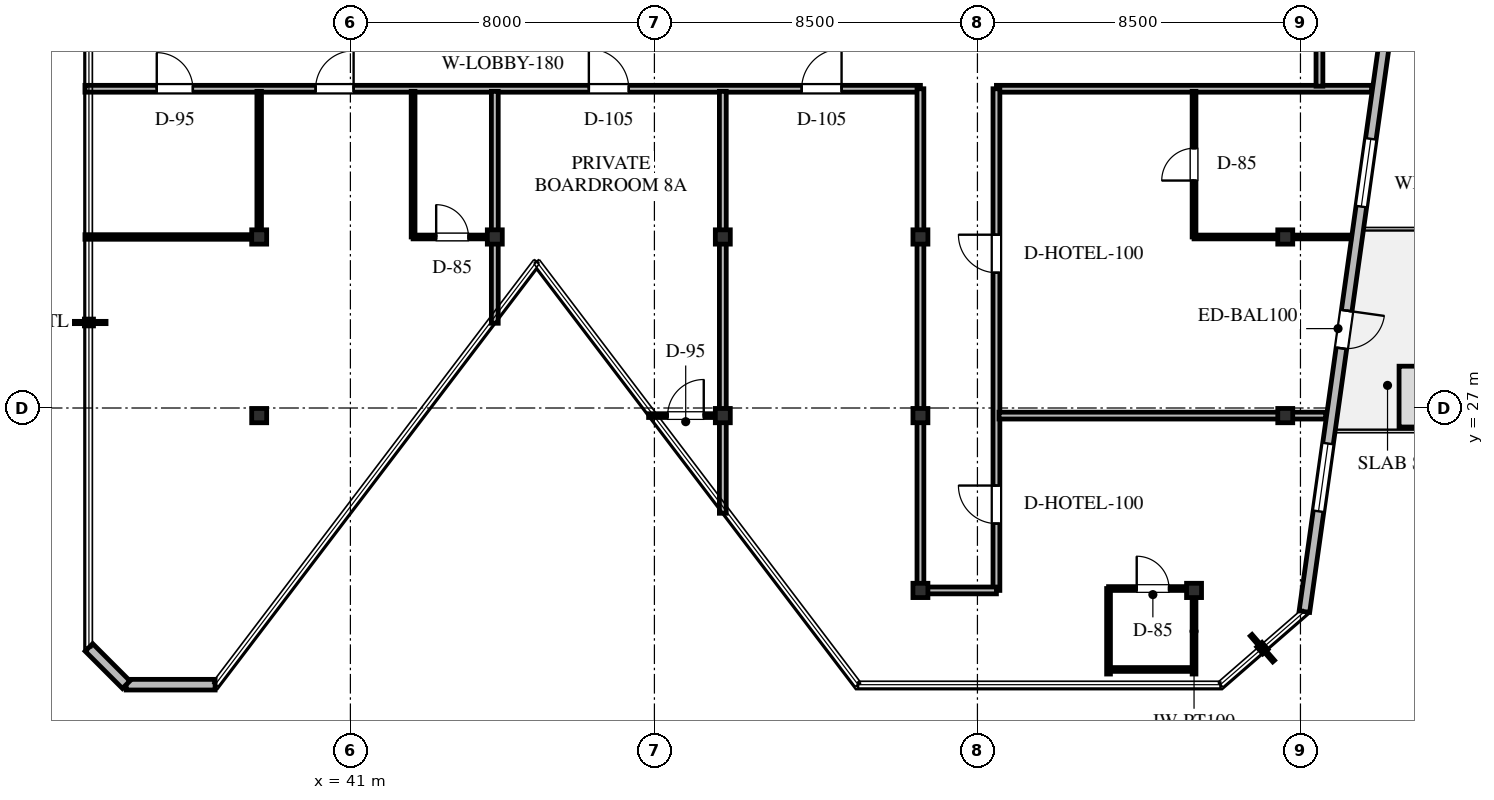
"""IFC4 building model, lengths in metres.
Left out: names, types, materials, properties, quantities, classifications, styles, units other than length and angle.
Written with IfcOpenShell. Run it as: python <this file> out.ifc"""

import sys

from ifc_helpers import new_model, si_unit, direction, frame, frame_2d, origin, origin_2d, place, context, subcontext, project, spatial, rectangle, i_section, extrude, element, fill, save


model = new_model("IFC4")
c1 = context("Model", 3, precision=1e-05, world=origin(), true_north=direction((0.0, 1.0)))
c2 = subcontext(c1, "Body", "Model", "MODEL_VIEW")
j1 = project(units=[si_unit("LENGTHUNIT", "METRE"), si_unit("PLANEANGLEUNIT", "RADIAN")], contexts=[c1])
p1 = place(None, origin())
s1 = spatial("IfcSite", under=j1, at=p1, CompositionType="ELEMENT")
p2 = place(p1, origin())
s2 = spatial("IfcBuilding", under=s1, at=p2, CompositionType="ELEMENT")
p3 = place(p2, frame((0.0, 0.0, 303.9)))
s3 = spatial("IfcBuildingStorey", under=s2, at=p3, CompositionType="ELEMENT", Elevation=303.9)
for number, where, z_axis, x_axis in (
    (1, (44.8, 31.5, 0.0), (0.0, 0.0, 1.0), (1.0, 0.0, 0.0)),
    (2, (50.8, 31.5, 0.0), (0.0, 0.0, 1.0), (1.0, 0.0, 0.0)),
    (3, (56.0, 31.5, 0.0), (0.0, 0.0, 1.0), (1.0, 0.0, 0.0)),
    (4, (65.6, 31.5, 0.0), (0.0, 0.0, 1.0), (1.0, 0.0, 0.0)),
    (5, (38.6, 31.5, 0.0), (0.0, 0.0, 1.0), (1.0, 0.0, 0.0)),
    (6, (38.6, 26.8, 0.0), (0.0, 0.0, 1.0), (1.0, 0.0, 0.0)),
    (7, (50.8, 26.8, 0.0), (0.0, 0.0, 1.0), (1.0, 0.0, 0.0)),
    (8, (56.0, 26.8, 0.0), (0.0, 0.0, 1.0), (1.0, 0.0, 0.0)),
    (9, (65.6, 26.8, 0.0), (0.0, 0.0, 1.0), (1.0, 0.0, 0.0)),
    (10, (56.0, 22.2, 0.0), (0.0, 0.0, 1.0), (1.0, 0.0, 0.0)),
    (11, (63.2, 22.2, 0.0), (0.0, 0.0, 1.0), (1.0, 0.0, 0.0)),
):
    element("IfcColumn", number, at=place(p3, frame(where, z_axis=z_axis, x_axis=x_axis)), inside=s3, PredefinedType="COLUMN", context=c2, shape_type="SweptSolid", body=[
        extrude(i_section(OverallWidth=0.394, OverallDepth=0.376, WebThickness=0.017, FlangeThickness=0.028, FilletRadius=0.03, at=origin_2d()), origin(), (0.0, 0.0, 1.0), 3.6),
    ])
p4 = place(p3, frame((68.375, 37.8, 0.0), z_axis=(0.0, 0.0, 1.0), x_axis=(-0.139177573889, -0.990267440102, 0.0)))
e12 = element("IfcWall", 12, at=p4, inside=s3, PredefinedType="STANDARD", context=c2, shape_type="SweptSolid", body=[
    extrude(rectangle(XDim=16.317, YDim=0.28, at=frame_2d((8.159, 0.0))), origin(), (0.0, 0.0, 1.0), 3.365),
])
p5 = place(p4, frame((8.319, 0.0, 0.0)))
e13 = element("IfcOpeningElement", 13, at=p5, cuts=e12, PredefinedType="OPENING", context=c2, shape_type="SweptSolid", body=[
    extrude(rectangle(XDim=1.0, YDim=2.15, at=frame_2d((0.5, 1.075))), frame((0.0, 0.15, 0.0), z_axis=(0.0, -1.0, 0.0), x_axis=(1.0, 0.0, 0.0)), (0.0, 0.0, 1.0), 0.3),
])
p6 = place(p4, frame((3.754, 0.0, 0.65)))
e14 = element("IfcOpeningElement", 14, at=p6, cuts=e12, PredefinedType="OPENING", context=c2, shape_type="SweptSolid", body=[
    extrude(rectangle(XDim=1.8, YDim=2.1, at=frame_2d((0.9, 1.05))), frame((0.0, 0.15, 0.0), z_axis=(0.0, -1.0, 0.0), x_axis=(1.0, 0.0, 0.0)), (0.0, 0.0, 1.0), 0.3),
])
p7 = place(p4, frame((11.85, 0.0, 0.65)))
e15 = element("IfcOpeningElement", 15, at=p7, cuts=e12, PredefinedType="OPENING", context=c2, shape_type="SweptSolid", body=[
    extrude(rectangle(XDim=1.8, YDim=2.1, at=frame_2d((0.9, 1.05))), frame((0.0, 0.15, 0.0), z_axis=(0.0, -1.0, 0.0), x_axis=(1.0, 0.0, 0.0)), (0.0, 0.0, 1.0), 0.3),
])
p8 = place(p3, frame((37.44, 19.72, 0.0), z_axis=(0.0, 0.0, 1.0), x_axis=(-1.0, 0.0, 0.0)))
e16 = element("IfcWall", 16, at=p8, inside=s3, PredefinedType="STANDARD", context=c2, shape_type="SweptSolid", body=[
    extrude(rectangle(XDim=2.341, YDim=0.28, at=frame_2d((1.17, 0.0))), origin(), (0.0, 0.0, 1.0), 3.365),
])
p9 = place(p3, frame((35.1, 19.72, 0.0), z_axis=(0.0, 0.0, 1.0), x_axis=(-0.707018662703, 0.70719488869, 0.0)))
e17 = element("IfcWall", 17, at=p9, inside=s3, PredefinedType="STANDARD", context=c2, shape_type="SweptSolid", body=[
    extrude(rectangle(XDim=1.385, YDim=0.28, at=frame_2d((0.693, 0.0))), origin(), (0.0, 0.0, 1.0), 3.365),
])
p10 = place(p3, frame((34.015, 35.4, 0.0), z_axis=(0.0, 0.0, 1.0), x_axis=(1.0, 0.0, 0.0)))
e18 = element("IfcWall", 18, at=p10, inside=s3, PredefinedType="STANDARD", context=c2, shape_type="SweptSolid", body=[
    extrude(rectangle(XDim=21.985, YDim=0.18, at=frame_2d((10.993, 0.0))), origin(), (0.0, 0.0, 1.0), 2.754),
])
p11 = place(p10, frame((1.89, 0.0, 0.0)))
e19 = element("IfcOpeningElement", 19, at=p11, cuts=e18, PredefinedType="OPENING", context=c2, shape_type="SweptSolid", body=[
    extrude(rectangle(XDim=0.95, YDim=2.15, at=frame_2d((0.475, 1.075))), frame((0.0, 0.1, 0.0), z_axis=(0.0, -1.0, 0.0), x_axis=(1.0, 0.0, 0.0)), (0.0, 0.0, 1.0), 0.2),
])
p12 = place(p10, frame((6.07, 0.0, 0.0)))
e20 = element("IfcOpeningElement", 20, at=p12, cuts=e18, PredefinedType="OPENING", context=c2, shape_type="SweptSolid", body=[
    extrude(rectangle(XDim=1.0, YDim=2.15, at=frame_2d((0.5, 1.075))), frame((0.0, 0.1, 0.0), z_axis=(0.0, -1.0, 0.0), x_axis=(1.0, 0.0, 0.0)), (0.0, 0.0, 1.0), 0.2),
])
p13 = place(p10, frame((13.26, 0.0, 0.0)))
e21 = element("IfcOpeningElement", 21, at=p13, cuts=e18, PredefinedType="OPENING", context=c2, shape_type="SweptSolid", body=[
    extrude(rectangle(XDim=1.05, YDim=2.2, at=frame_2d((0.525, 1.1))), frame((0.0, 0.1, 0.0), z_axis=(0.0, -1.0, 0.0), x_axis=(1.0, 0.0, 0.0)), (0.0, 0.0, 1.0), 0.2),
])
p14 = place(p10, frame((18.86, 0.0, 0.0)))
e22 = element("IfcOpeningElement", 22, at=p14, cuts=e18, PredefinedType="OPENING", context=c2, shape_type="SweptSolid", body=[
    extrude(rectangle(XDim=1.05, YDim=2.2, at=frame_2d((0.525, 1.1))), frame((0.0, 0.1, 0.0), z_axis=(0.0, -1.0, 0.0), x_axis=(1.0, 0.0, 0.0)), (0.0, 0.0, 1.0), 0.2),
])
p15 = place(p3, frame((58.0, 35.4, 0.0), z_axis=(0.0, 0.0, 1.0), x_axis=(1.0, 0.0, 0.0)))
e23 = element("IfcWall", 23, at=p15, inside=s3, PredefinedType="STANDARD", context=c2, shape_type="SweptSolid", body=[
    extrude(rectangle(XDim=9.871, YDim=0.18, at=frame_2d((4.936, 0.0))), origin(), (0.0, 0.0, 1.0), 3.365),
])
p16 = place(p3, frame((66.5, 35.468, 0.0), z_axis=(0.0, 0.0, 1.0), x_axis=(0.0, 1.0, 0.0)))
e24 = element("IfcWall", 24, at=p16, inside=s3, PredefinedType="STANDARD", context=c2, shape_type="SweptSolid", body=[
    extrude(rectangle(XDim=2.582, YDim=0.18, at=frame_2d((1.291, 0.0))), origin(), (0.0, 0.0, 1.0), 2.754),
])
p17 = place(p3, frame((56.0, 22.2, 0.0), z_axis=(0.0, 0.0, 1.0), x_axis=(0.0, 1.0, 0.0)))
e25 = element("IfcWall", 25, at=p17, inside=s3, PredefinedType="STANDARD", context=c2, shape_type="SweptSolid", body=[
    extrude(rectangle(XDim=13.2, YDim=0.18, at=frame_2d((6.6, 0.0))), origin(), (0.0, 0.0, 1.0), 2.754),
])
p18 = place(p3, frame((58.0, 22.2, 0.0), z_axis=(0.0, 0.0, 1.0), x_axis=(0.0, 1.0, 0.0)))
e26 = element("IfcWall", 26, at=p18, inside=s3, PredefinedType="STANDARD", context=c2, shape_type="SweptSolid", body=[
    extrude(rectangle(XDim=13.2, YDim=0.18, at=frame_2d((6.6, 0.0))), origin(), (0.0, 0.0, 1.0), 2.754),
])
p19 = place(p18, frame((1.76, 0.0, 0.0)))
e27 = element("IfcOpeningElement", 27, at=p19, cuts=e26, PredefinedType="OPENING", context=c2, shape_type="SweptSolid", body=[
    extrude(rectangle(XDim=1.0, YDim=2.15, at=frame_2d((0.5, 1.075))), frame((0.0, 0.1, 0.0), z_axis=(0.0, -1.0, 0.0), x_axis=(1.0, 0.0, 0.0)), (0.0, 0.0, 1.0), 0.2),
])
p20 = place(p18, frame((8.36, 0.0, 0.0)))
e28 = element("IfcOpeningElement", 28, at=p20, cuts=e26, PredefinedType="OPENING", context=c2, shape_type="SweptSolid", body=[
    extrude(rectangle(XDim=1.0, YDim=2.15, at=frame_2d((0.5, 1.075))), frame((0.0, 0.1, 0.0), z_axis=(0.0, -1.0, 0.0), x_axis=(1.0, 0.0, 0.0)), (0.0, 0.0, 1.0), 0.2),
])
p21 = place(p3, frame((56.0, 22.2, 0.0), z_axis=(0.0, 0.0, 1.0), x_axis=(1.0, 0.0, 0.0)))
e29 = element("IfcWall", 29, at=p21, inside=s3, PredefinedType="STANDARD", context=c2, shape_type="SweptSolid", body=[
    extrude(rectangle(XDim=2.0, YDim=0.18, at=frame_2d((1.0, 0.0))), origin(), (0.0, 0.0, 1.0), 2.754),
])
p22 = place(p3, frame((38.6, 31.5, 0.0), z_axis=(0.0, 0.0, 1.0), x_axis=(0.0, 1.0, 0.0)))
e30 = element("IfcWall", 30, at=p22, inside=s3, PredefinedType="PARTITIONING", context=c2, shape_type="SweptSolid", body=[
    extrude(rectangle(XDim=3.832, YDim=0.12, at=frame_2d((1.916, 0.0))), origin(), (0.0, 0.0, 1.0), 2.754),
])
p23 = place(p3, frame((34.015, 31.5, 0.0), z_axis=(0.0, 0.0, 1.0), x_axis=(1.0, 0.0, 0.0)))
e31 = element("IfcWall", 31, at=p23, inside=s3, PredefinedType="PARTITIONING", context=c2, shape_type="SweptSolid", body=[
    extrude(rectangle(XDim=4.585, YDim=0.12, at=frame_2d((2.292, 0.0))), origin(), (0.0, 0.0, 1.0), 2.754),
])
p24 = place(p3, frame((58.068, 26.8, 0.0), z_axis=(0.0, 0.0, 1.0), x_axis=(1.0, 0.0, 0.0)))
e32 = element("IfcWall", 32, at=p24, inside=s3, PredefinedType="STANDARD", context=c2, shape_type="SweptSolid", body=[
    extrude(rectangle(XDim=8.594, YDim=0.18, at=frame_2d((4.297, 0.0))), origin(), (0.0, 0.0, 1.0), 2.754),
])
p25 = place(p3, frame((60.95, 22.25, 0.0), z_axis=(0.0, 0.0, 1.0), x_axis=(1.0, 0.0, 0.0)))
e33 = element("IfcWall", 33, at=p25, inside=s3, PredefinedType="PARTITIONING", context=c2, shape_type="SweptSolid", body=[
    extrude(rectangle(XDim=2.25, YDim=0.1, at=frame_2d((1.125, 0.0))), origin(), (0.0, 0.0, 1.0), 2.754),
])
p26 = place(p25, frame((0.741, 0.0, 0.0)))
e34 = element("IfcOpeningElement", 34, at=p26, cuts=e33, PredefinedType="OPENING", context=c2, shape_type="SweptSolid", body=[
    extrude(rectangle(XDim=0.85, YDim=2.1, at=frame_2d((0.425, 1.05))), frame((0.0, 0.06, 0.0), z_axis=(0.0, -1.0, 0.0), x_axis=(1.0, 0.0, 0.0)), (0.0, 0.0, 1.0), 0.12),
])
for number, where, z_axis, x_axis in (
    (35, (60.95, 20.0, 0.0), (0.0, 0.0, 1.0), (0.0, 1.0, 0.0)),
    (36, (63.2, 20.0, 0.0), (0.0, 0.0, 1.0), (0.0, 1.0, 0.0)),
):
    element("IfcWall", number, at=place(p3, frame(where, z_axis=z_axis, x_axis=x_axis)), inside=s3, PredefinedType="PARTITIONING", context=c2, shape_type="SweptSolid", body=[
        extrude(rectangle(XDim=2.25, YDim=0.1, at=frame_2d((1.125, 0.0))), origin(), (0.0, 0.0, 1.0), 2.754),
    ])
p27 = place(p3, frame((61.018, 20.12, 0.0), z_axis=(0.0, 0.0, 1.0), x_axis=(1.0, 0.0, 0.0)))
e37 = element("IfcWall", 37, at=p27, inside=s3, PredefinedType="PARTITIONING", context=c2, shape_type="SweptSolid", body=[
    extrude(rectangle(XDim=2.114, YDim=0.1, at=frame_2d((1.057, 0.0))), origin(), (0.0, 0.0, 1.0), 3.365),
])
p28 = place(p3, frame((63.2, 31.5, 0.0), z_axis=(0.0, 0.0, 1.0), x_axis=(1.0, 0.0, 0.0)))
e38 = element("IfcWall", 38, at=p28, inside=s3, PredefinedType="PARTITIONING", context=c2, shape_type="SweptSolid", body=[
    extrude(rectangle(XDim=4.123, YDim=0.1, at=frame_2d((2.062, 0.0))), origin(), (0.0, 0.0, 1.0), 2.754),
])
p29 = place(p3, frame((63.2, 31.5, 0.0), z_axis=(0.0, 0.0, 1.0), x_axis=(0.0, 1.0, 0.0)))
e39 = element("IfcWall", 39, at=p29, inside=s3, PredefinedType="PARTITIONING", context=c2, shape_type="SweptSolid", body=[
    extrude(rectangle(XDim=3.832, YDim=0.1, at=frame_2d((1.916, 0.0))), origin(), (0.0, 0.0, 1.0), 2.754),
])
p30 = place(p29, frame((1.485, 0.0, 0.0)))
e40 = element("IfcOpeningElement", 40, at=p30, cuts=e39, PredefinedType="OPENING", context=c2, shape_type="SweptSolid", body=[
    extrude(rectangle(XDim=0.85, YDim=2.1, at=frame_2d((0.425, 1.05))), frame((0.0, 0.06, 0.0), z_axis=(0.0, -1.0, 0.0), x_axis=(1.0, 0.0, 0.0)), (0.0, 0.0, 1.0), 0.12),
])
p31 = place(p3, frame((42.65, 31.5, 0.0), z_axis=(0.0, 0.0, 1.0), x_axis=(0.0, 1.0, 0.0)))
e41 = element("IfcWall", 41, at=p31, inside=s3, PredefinedType="PARTITIONING", context=c2, shape_type="SweptSolid", body=[
    extrude(rectangle(XDim=3.832, YDim=0.1, at=frame_2d((1.916, 0.0))), origin(), (0.0, 0.0, 1.0), 2.754),
])
p32 = place(p3, frame((42.65, 31.5, 0.0), z_axis=(0.0, 0.0, 1.0), x_axis=(1.0, 0.0, 0.0)))
e42 = element("IfcWall", 42, at=p32, inside=s3, PredefinedType="PARTITIONING", context=c2, shape_type="SweptSolid", body=[
    extrude(rectangle(XDim=2.082, YDim=0.1, at=frame_2d((1.041, 0.0))), origin(), (0.0, 0.0, 1.0), 2.754),
])
p33 = place(p32, frame((0.607, 0.0, 0.0)))
e43 = element("IfcOpeningElement", 43, at=p33, cuts=e42, PredefinedType="OPENING", context=c2, shape_type="SweptSolid", body=[
    extrude(rectangle(XDim=0.85, YDim=2.1, at=frame_2d((0.425, 1.05))), frame((0.0, 0.06, 0.0), z_axis=(0.0, -1.0, 0.0), x_axis=(1.0, 0.0, 0.0)), (0.0, 0.0, 1.0), 0.12),
])
p34 = place(p3, frame((44.8, 29.23, 0.0), z_axis=(0.0, 0.0, 1.0), x_axis=(0.0, 1.0, 0.0)))
e44 = element("IfcWall", 44, at=p34, inside=s3, PredefinedType="STANDARD", context=c2, shape_type="SweptSolid", body=[
    extrude(rectangle(XDim=6.102, YDim=0.18, at=frame_2d((3.051, 0.0))), origin(), (0.0, 0.0, 1.0), 2.754),
])
p35 = place(p3, frame((48.847, 26.8, 0.0), z_axis=(0.0, 0.0, 1.0), x_axis=(1.0, 0.0, 0.0)))
e45 = element("IfcWall", 45, at=p35, inside=s3, PredefinedType="PARTITIONING", context=c2, shape_type="SweptSolid", body=[
    extrude(rectangle(XDim=1.885, YDim=0.1, at=frame_2d((0.943, 0.0))), origin(), (0.0, 0.0, 1.0), 2.754),
])
p36 = place(p35, frame((0.502, 0.0, 0.0)))
e46 = element("IfcOpeningElement", 46, at=p36, cuts=e45, PredefinedType="OPENING", context=c2, shape_type="SweptSolid", body=[
    extrude(rectangle(XDim=0.95, YDim=2.15, at=frame_2d((0.475, 1.075))), frame((0.0, 0.06, 0.0), z_axis=(0.0, -1.0, 0.0), x_axis=(1.0, 0.0, 0.0)), (0.0, 0.0, 1.0), 0.12),
])
p37 = place(p3, frame((50.8, 24.23, 0.0), z_axis=(0.0, 0.0, 1.0), x_axis=(0.0, 1.0, 0.0)))
e47 = element("IfcWall", 47, at=p37, inside=s3, PredefinedType="STANDARD", context=c2, shape_type="SweptSolid", body=[
    extrude(rectangle(XDim=11.102, YDim=0.18, at=frame_2d((5.551, 0.0))), origin(), (0.0, 0.0, 1.0), 2.754),
])
p38 = place(p5, origin())
e48 = element("IfcDoor", 48, at=p38, inside=s3, OperationType="SINGLE_SWING_LEFT", PredefinedType="DOOR", context=c2, shape_type="SweptSolid", body=[
    extrude(rectangle(XDim=1.0, YDim=2.15, at=frame_2d((0.5, 1.075))), frame((0.0, 0.025, 0.0), z_axis=(0.0, -1.0, 0.0), x_axis=(1.0, 0.0, 0.0)), (0.0, 0.0, 1.0), 0.05),
])
fill(e13, e48)
p39 = place(p6, origin())
e49 = element("IfcWindow", 49, at=p39, inside=s3, PartitioningType="SINGLE_PANEL", PredefinedType="WINDOW", context=c2, shape_type="SweptSolid", body=[
    extrude(rectangle(XDim=1.8, YDim=2.1, at=frame_2d((0.9, 1.05))), frame((0.0, 0.03, 0.0), z_axis=(0.0, -1.0, 0.0), x_axis=(1.0, 0.0, 0.0)), (0.0, 0.0, 1.0), 0.06),
])
fill(e14, e49)
p40 = place(p7, origin())
e50 = element("IfcWindow", 50, at=p40, inside=s3, PartitioningType="SINGLE_PANEL", PredefinedType="WINDOW", context=c2, shape_type="SweptSolid", body=[
    extrude(rectangle(XDim=1.8, YDim=2.1, at=frame_2d((0.9, 1.05))), frame((0.0, 0.03, 0.0), z_axis=(0.0, -1.0, 0.0), x_axis=(1.0, 0.0, 0.0)), (0.0, 0.0, 1.0), 0.06),
])
fill(e15, e50)
p41 = place(p11, origin())
e51 = element("IfcDoor", 51, at=p41, inside=s3, OperationType="SINGLE_SWING_LEFT", PredefinedType="DOOR", context=c2, shape_type="SweptSolid", body=[
    extrude(rectangle(XDim=0.95, YDim=2.15, at=frame_2d((0.475, 1.075))), frame((0.0, 0.025, 0.0), z_axis=(0.0, -1.0, 0.0), x_axis=(1.0, 0.0, 0.0)), (0.0, 0.0, 1.0), 0.05),
])
fill(e19, e51)
p42 = place(p19, origin())
e52 = element("IfcDoor", 52, at=p42, inside=s3, OperationType="SINGLE_SWING_RIGHT", PredefinedType="DOOR", context=c2, shape_type="SweptSolid", body=[
    extrude(rectangle(XDim=1.0, YDim=2.15, at=frame_2d((0.5, 1.075))), frame((0.0, 0.025, 0.0), z_axis=(0.0, -1.0, 0.0), x_axis=(1.0, 0.0, 0.0)), (0.0, 0.0, 1.0), 0.05),
])
fill(e27, e52)
p43 = place(p26, origin())
e53 = element("IfcDoor", 53, at=p43, inside=s3, OperationType="SINGLE_SWING_LEFT", PredefinedType="DOOR", context=c2, shape_type="SweptSolid", body=[
    extrude(rectangle(XDim=0.85, YDim=2.1, at=frame_2d((0.425, 1.05))), frame((0.0, 0.025, 0.0), z_axis=(0.0, -1.0, 0.0), x_axis=(1.0, 0.0, 0.0)), (0.0, 0.0, 1.0), 0.05),
])
fill(e34, e53)
p44 = place(p20, origin())
e54 = element("IfcDoor", 54, at=p44, inside=s3, OperationType="SINGLE_SWING_RIGHT", PredefinedType="DOOR", context=c2, shape_type="SweptSolid", body=[
    extrude(rectangle(XDim=1.0, YDim=2.15, at=frame_2d((0.5, 1.075))), frame((0.0, 0.025, 0.0), z_axis=(0.0, -1.0, 0.0), x_axis=(1.0, 0.0, 0.0)), (0.0, 0.0, 1.0), 0.05),
])
fill(e28, e54)
p45 = place(p30, origin())
e55 = element("IfcDoor", 55, at=p45, inside=s3, OperationType="SINGLE_SWING_LEFT", PredefinedType="DOOR", context=c2, shape_type="SweptSolid", body=[
    extrude(rectangle(XDim=0.85, YDim=2.1, at=frame_2d((0.425, 1.05))), frame((0.0, 0.025, 0.0), z_axis=(0.0, -1.0, 0.0), x_axis=(1.0, 0.0, 0.0)), (0.0, 0.0, 1.0), 0.05),
])
fill(e40, e55)
p46 = place(p12, origin())
e56 = element("IfcDoor", 56, at=p46, inside=s3, OperationType="SINGLE_SWING_RIGHT", PredefinedType="DOOR", context=c2, shape_type="SweptSolid", body=[
    extrude(rectangle(XDim=1.0, YDim=2.15, at=frame_2d((0.5, 1.075))), frame((0.0, 0.025, 0.0), z_axis=(0.0, -1.0, 0.0), x_axis=(1.0, 0.0, 0.0)), (0.0, 0.0, 1.0), 0.05),
])
fill(e20, e56)
p47 = place(p33, origin())
e57 = element("IfcDoor", 57, at=p47, inside=s3, OperationType="SINGLE_SWING_LEFT", PredefinedType="DOOR", context=c2, shape_type="SweptSolid", body=[
    extrude(rectangle(XDim=0.85, YDim=2.1, at=frame_2d((0.425, 1.05))), frame((0.0, 0.025, 0.0), z_axis=(0.0, -1.0, 0.0), x_axis=(1.0, 0.0, 0.0)), (0.0, 0.0, 1.0), 0.05),
])
fill(e43, e57)
p48 = place(p36, origin())
e58 = element("IfcDoor", 58, at=p48, inside=s3, OperationType="SINGLE_SWING_RIGHT", PredefinedType="DOOR", context=c2, shape_type="SweptSolid", body=[
    extrude(rectangle(XDim=0.95, YDim=2.15, at=frame_2d((0.475, 1.075))), frame((0.0, 0.025, 0.0), z_axis=(0.0, -1.0, 0.0), x_axis=(1.0, 0.0, 0.0)), (0.0, 0.0, 1.0), 0.05),
])
fill(e46, e58)
p49 = place(p13, origin())
e59 = element("IfcDoor", 59, at=p49, inside=s3, OperationType="SINGLE_SWING_LEFT", PredefinedType="DOOR", context=c2, shape_type="SweptSolid", body=[
    extrude(rectangle(XDim=1.05, YDim=2.2, at=frame_2d((0.525, 1.1))), frame((0.0, 0.025, 0.0), z_axis=(0.0, -1.0, 0.0), x_axis=(1.0, 0.0, 0.0)), (0.0, 0.0, 1.0), 0.05),
])
fill(e21, e59)
p50 = place(p14, origin())
e60 = element("IfcDoor", 60, at=p50, inside=s3, OperationType="SINGLE_SWING_RIGHT", PredefinedType="DOOR", context=c2, shape_type="SweptSolid", body=[
    extrude(rectangle(XDim=1.05, YDim=2.2, at=frame_2d((0.525, 1.1))), frame((0.0, 0.025, 0.0), z_axis=(0.0, -1.0, 0.0), x_axis=(1.0, 0.0, 0.0)), (0.0, 0.0, 1.0), 0.05),
])
fill(e22, e60)
save(model, sys.argv[1])
